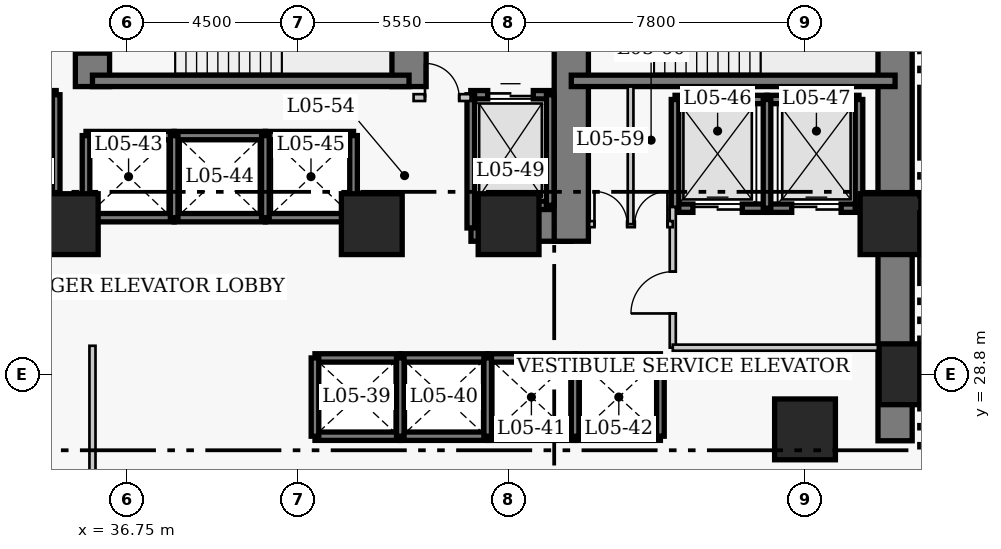
"""IFC4 building model, lengths in metres.
Left out: names, types, materials, properties, quantities, classifications, styles, units other than length and angle.
Written with IfcOpenShell. Run it as: python <this file> out.ifc"""

import sys

from ifc_helpers import new_model, si_unit, direction, frame, frame_2d, origin, origin_2d, place, context, subcontext, project, spatial, rectangle, extrude, element, fill, save


model = new_model("IFC4")
c1 = context("Model", 3, precision=1e-05, world=origin(), true_north=direction((0.0, 1.0)))
c2 = subcontext(c1, "Body", "Model", "MODEL_VIEW")
j1 = project(units=[si_unit("LENGTHUNIT", "METRE"), si_unit("PLANEANGLEUNIT", "RADIAN")], contexts=[c1])
p1 = place(None, origin())
s1 = spatial("IfcSite", under=j1, at=p1, CompositionType="ELEMENT")
p2 = place(p1, origin())
s2 = spatial("IfcBuilding", under=s1, at=p2, CompositionType="ELEMENT")
p3 = place(p2, frame((0.0, 0.0, 26.0)))
s3 = spatial("IfcBuildingStorey", under=s2, at=p3, CompositionType="ELEMENT", Elevation=26.0)
p4 = place(p3, frame((56.97, 27.05, 0.0), z_axis=(0.0, 0.0, 1.0), x_axis=(0.0, 1.0, 0.0)))
e1 = element("IfcWall", 1, at=p4, inside=s3, PredefinedType="SHEAR", context=c2, shape_type="SweptSolid", body=[
    extrude(rectangle(XDim=13.72, YDim=0.9, at=frame_2d((6.86, 0.0))), origin(), (0.0, 0.0, 1.0), 3.8),
])
p5 = place(p3, frame((45.81, 32.75, 0.0), z_axis=(0.0, 0.0, 1.0), x_axis=(1.0, 0.0, 0.0)))
e2 = element("IfcWall", 2, at=p5, inside=s3, PredefinedType="SHEAR", context=c2, shape_type="SweptSolid", body=[
    extrude(rectangle(XDim=2.64, YDim=0.9, at=frame_2d((1.32, 0.0))), origin(), (0.0, 0.0, 1.0), 3.8),
])
p6 = place(p3, frame((35.85, 36.37, 0.0), z_axis=(0.0, 0.0, 1.0), x_axis=(0.0, 1.0, 0.0)))
e3 = element("IfcWall", 3, at=p6, inside=s3, PredefinedType="SHEAR", context=c2, shape_type="SweptSolid", body=[
    extrude(rectangle(XDim=3.95, YDim=0.9, at=frame_2d((1.975, 0.0))), origin(), (0.0, 0.0, 1.0), 3.8),
])
p7 = place(p6, frame((0.88, 0.0, 0.0)))
e4 = element("IfcOpeningElement", 4, at=p7, cuts=e3, PredefinedType="OPENING", context=c2, shape_type="SweptSolid", body=[
    extrude(rectangle(XDim=1.1, YDim=2.15, at=frame_2d((0.55, 1.075))), frame((0.0, 0.46, 0.0), z_axis=(0.0, -1.0, 0.0), x_axis=(1.0, 0.0, 0.0)), (0.0, 0.0, 1.0), 0.92),
])
p8 = place(p3, frame((44.18, 36.37, 0.0), z_axis=(0.0, 0.0, 1.0), x_axis=(0.0, 1.0, 0.0)))
e5 = element("IfcWall", 5, at=p8, inside=s3, PredefinedType="SHEAR", context=c2, shape_type="SweptSolid", body=[
    extrude(rectangle(XDim=3.95, YDim=0.9, at=frame_2d((1.975, 0.0))), origin(), (0.0, 0.0, 1.0), 3.8),
])
p9 = place(p3, frame((48.45, 32.3, 0.0), z_axis=(0.0, 0.0, 1.0), x_axis=(0.0, 1.0, 0.0)))
e6 = element("IfcWall", 6, at=p9, inside=s3, PredefinedType="SHEAR", context=c2, shape_type="SweptSolid", body=[
    extrude(rectangle(XDim=8.02, YDim=0.9, at=frame_2d((4.01, 0.0))), origin(), (0.0, 0.0, 1.0), 3.8),
])
p10 = place(p9, frame((5.9, 0.0, 0.0)))
e7 = element("IfcOpeningElement", 7, at=p10, cuts=e6, PredefinedType="OPENING", context=c2, shape_type="SweptSolid", body=[
    extrude(rectangle(XDim=1.1, YDim=2.15, at=frame_2d((0.55, 1.075))), frame((0.0, 0.46, 0.0), z_axis=(0.0, -1.0, 0.0), x_axis=(1.0, 0.0, 0.0)), (0.0, 0.0, 1.0), 0.92),
])
p11 = place(p3, frame((35.85, 36.52, 0.0), z_axis=(0.0, 0.0, 1.0), x_axis=(1.0, 0.0, 0.0)))
e8 = element("IfcWall", 8, at=p11, inside=s3, PredefinedType="SHEAR", context=c2, shape_type="SweptSolid", body=[
    extrude(rectangle(XDim=8.33, YDim=0.3, at=frame_2d((4.165, 0.0))), origin(), (0.0, 0.0, 1.0), 3.8),
])
p12 = place(p3, frame((48.45, 36.52, 0.0), z_axis=(0.0, 0.0, 1.0), x_axis=(1.0, 0.0, 0.0)))
e9 = element("IfcWall", 9, at=p12, inside=s3, PredefinedType="SHEAR", context=c2, shape_type="SweptSolid", body=[
    extrude(rectangle(XDim=8.52, YDim=0.3, at=frame_2d((4.26, 0.0))), origin(), (0.0, 0.0, 1.0), 3.8),
])
for number, where, z_axis, x_axis in (
    (10, (57.35, 28.8, 0.0), (0.0, 0.0, 1.0), (1.0, 0.0, 0.0)),
    (11, (35.2, 32.75, 0.0), (0.0, 0.0, 1.0), (1.0, 0.0, 0.0)),
    (12, (43.2, 32.75, 0.0), (0.0, 0.0, 1.0), (1.0, 0.0, 0.0)),
    (13, (46.8, 32.75, 0.0), (0.0, 0.0, 1.0), (1.0, 0.0, 0.0)),
    (14, (54.6, 27.35, 0.0), (0.0, 0.0, 1.0), (1.0, 0.0, 0.0)),
    (15, (56.85, 32.75, 0.0), (0.0, 0.0, 1.0), (1.0, 0.0, 0.0)),
):
    element("IfcColumn", number, at=place(p3, frame(where, z_axis=z_axis, x_axis=x_axis)), inside=s3, PredefinedType="COLUMN", context=c2, shape_type="SweptSolid", body=[
        extrude(rectangle(XDim=1.6, YDim=1.6, at=origin_2d()), origin(), (0.0, 0.0, 1.0), 3.8),
    ])
for number, where, z_axis, x_axis in (
    (16, (41.705, 29.23, 0.0), (0.0, 0.0, 1.0), (1.0, 0.0, 0.0)),
    (17, (41.705, 27.17, 0.0), (0.0, 0.0, 1.0), (1.0, 0.0, 0.0)),
):
    element("IfcWall", number, at=place(p3, frame(where, z_axis=z_axis, x_axis=x_axis)), inside=s3, PredefinedType="SHEAR", context=c2, shape_type="SweptSolid", body=[
        extrude(rectangle(XDim=2.245, YDim=0.22, at=frame_2d((1.123, 0.0))), origin(), (0.0, 0.0, 1.0), 3.8),
    ])
p13 = place(p3, frame((41.705, 27.17, 0.0), z_axis=(0.0, 0.0, 1.0), x_axis=(0.0, 1.0, 0.0)))
e18 = element("IfcWall", 18, at=p13, inside=s3, PredefinedType="SHEAR", context=c2, shape_type="SweptSolid", body=[
    extrude(rectangle(XDim=2.06, YDim=0.2, at=frame_2d((1.03, 0.0))), origin(), (0.0, 0.0, 1.0), 3.8),
])
for number, where, z_axis, x_axis in (
    (19, (43.95, 29.23, 0.0), (0.0, 0.0, 1.0), (1.0, 0.0, 0.0)),
    (20, (43.95, 27.17, 0.0), (0.0, 0.0, 1.0), (1.0, 0.0, 0.0)),
):
    element("IfcWall", number, at=place(p3, frame(where, z_axis=z_axis, x_axis=x_axis)), inside=s3, PredefinedType="SHEAR", context=c2, shape_type="SweptSolid", body=[
        extrude(rectangle(XDim=2.3, YDim=0.22, at=frame_2d((1.15, 0.0))), origin(), (0.0, 0.0, 1.0), 3.8),
    ])
p14 = place(p3, frame((43.95, 27.17, 0.0), z_axis=(0.0, 0.0, 1.0), x_axis=(0.0, 1.0, 0.0)))
e21 = element("IfcWall", 21, at=p14, inside=s3, PredefinedType="SHEAR", context=c2, shape_type="SweptSolid", body=[
    extrude(rectangle(XDim=2.06, YDim=0.2, at=frame_2d((1.03, 0.0))), origin(), (0.0, 0.0, 1.0), 3.8),
])
for number, where, z_axis, x_axis in (
    (22, (46.25, 29.23, 0.0), (0.0, 0.0, 1.0), (1.0, 0.0, 0.0)),
    (23, (46.25, 27.17, 0.0), (0.0, 0.0, 1.0), (1.0, 0.0, 0.0)),
):
    element("IfcWall", number, at=place(p3, frame(where, z_axis=z_axis, x_axis=x_axis)), inside=s3, PredefinedType="SHEAR", context=c2, shape_type="SweptSolid", body=[
        extrude(rectangle(XDim=2.3, YDim=0.22, at=frame_2d((1.15, 0.0))), origin(), (0.0, 0.0, 1.0), 3.8),
    ])
p15 = place(p3, frame((46.25, 27.17, 0.0), z_axis=(0.0, 0.0, 1.0), x_axis=(0.0, 1.0, 0.0)))
e24 = element("IfcWall", 24, at=p15, inside=s3, PredefinedType="SHEAR", context=c2, shape_type="SweptSolid", body=[
    extrude(rectangle(XDim=2.06, YDim=0.2, at=frame_2d((1.03, 0.0))), origin(), (0.0, 0.0, 1.0), 3.8),
])
for number, where, z_axis, x_axis in (
    (25, (48.55, 29.23, 0.0), (0.0, 0.0, 1.0), (1.0, 0.0, 0.0)),
    (26, (48.55, 27.17, 0.0), (0.0, 0.0, 1.0), (1.0, 0.0, 0.0)),
):
    element("IfcWall", number, at=place(p3, frame(where, z_axis=z_axis, x_axis=x_axis)), inside=s3, PredefinedType="SHEAR", context=c2, shape_type="SweptSolid", body=[
        extrude(rectangle(XDim=2.245, YDim=0.22, at=frame_2d((1.123, 0.0))), origin(), (0.0, 0.0, 1.0), 3.8),
    ])
for number, where, z_axis, x_axis in (
    (27, (48.55, 27.17, 0.0), (0.0, 0.0, 1.0), (0.0, 1.0, 0.0)),
    (28, (50.795, 27.17, 0.0), (0.0, 0.0, 1.0), (0.0, 1.0, 0.0)),
):
    element("IfcWall", number, at=place(p3, frame(where, z_axis=z_axis, x_axis=x_axis)), inside=s3, PredefinedType="SHEAR", context=c2, shape_type="SweptSolid", body=[
        extrude(rectangle(XDim=2.06, YDim=0.2, at=frame_2d((1.03, 0.0))), origin(), (0.0, 0.0, 1.0), 3.8),
    ])
for number, where, z_axis, x_axis in (
    (29, (35.68, 35.08, 0.0), (0.0, 0.0, 1.0), (1.0, 0.0, 0.0)),
    (30, (35.68, 32.92, 0.0), (0.0, 0.0, 1.0), (1.0, 0.0, 0.0)),
):
    element("IfcWall", number, at=place(p3, frame(where, z_axis=z_axis, x_axis=x_axis)), inside=s3, PredefinedType="SHEAR", context=c2, shape_type="SweptSolid", body=[
        extrude(rectangle(XDim=2.32, YDim=0.22, at=frame_2d((1.16, 0.0))), origin(), (0.0, 0.0, 1.0), 3.8),
    ])
p16 = place(p3, frame((35.68, 32.92, 0.0), z_axis=(0.0, 0.0, 1.0), x_axis=(0.0, 1.0, 0.0)))
e31 = element("IfcWall", 31, at=p16, inside=s3, PredefinedType="SHEAR", context=c2, shape_type="SweptSolid", body=[
    extrude(rectangle(XDim=2.16, YDim=0.2, at=frame_2d((1.08, 0.0))), origin(), (0.0, 0.0, 1.0), 3.8),
])
for number, where, z_axis, x_axis in (
    (32, (38.0, 35.08, 0.0), (0.0, 0.0, 1.0), (1.0, 0.0, 0.0)),
    (33, (38.0, 32.92, 0.0), (0.0, 0.0, 1.0), (1.0, 0.0, 0.0)),
):
    element("IfcWall", number, at=place(p3, frame(where, z_axis=z_axis, x_axis=x_axis)), inside=s3, PredefinedType="SHEAR", context=c2, shape_type="SweptSolid", body=[
        extrude(rectangle(XDim=2.4, YDim=0.22, at=frame_2d((1.2, 0.0))), origin(), (0.0, 0.0, 1.0), 3.8),
    ])
p17 = place(p3, frame((38.0, 32.92, 0.0), z_axis=(0.0, 0.0, 1.0), x_axis=(0.0, 1.0, 0.0)))
e34 = element("IfcWall", 34, at=p17, inside=s3, PredefinedType="SHEAR", context=c2, shape_type="SweptSolid", body=[
    extrude(rectangle(XDim=2.16, YDim=0.2, at=frame_2d((1.08, 0.0))), origin(), (0.0, 0.0, 1.0), 3.8),
])
for number, where, z_axis, x_axis in (
    (35, (40.4, 35.08, 0.0), (0.0, 0.0, 1.0), (1.0, 0.0, 0.0)),
    (36, (40.4, 32.92, 0.0), (0.0, 0.0, 1.0), (1.0, 0.0, 0.0)),
):
    element("IfcWall", number, at=place(p3, frame(where, z_axis=z_axis, x_axis=x_axis)), inside=s3, PredefinedType="SHEAR", context=c2, shape_type="SweptSolid", body=[
        extrude(rectangle(XDim=2.32, YDim=0.22, at=frame_2d((1.16, 0.0))), origin(), (0.0, 0.0, 1.0), 3.8),
    ])
for number, where, z_axis, x_axis in (
    (37, (40.4, 32.92, 0.0), (0.0, 0.0, 1.0), (0.0, 1.0, 0.0)),
    (38, (42.72, 32.92, 0.0), (0.0, 0.0, 1.0), (0.0, 1.0, 0.0)),
):
    element("IfcWall", number, at=place(p3, frame(where, z_axis=z_axis, x_axis=x_axis)), inside=s3, PredefinedType="SHEAR", context=c2, shape_type="SweptSolid", body=[
        extrude(rectangle(XDim=2.16, YDim=0.2, at=frame_2d((1.08, 0.0))), origin(), (0.0, 0.0, 1.0), 3.8),
    ])
p18 = place(p3, frame((51.18, 36.03, 0.0), z_axis=(0.0, 0.0, 1.0), x_axis=(1.0, 0.0, 0.0)))
e39 = element("IfcWall", 39, at=p18, inside=s3, PredefinedType="SHEAR", context=c2, shape_type="SweptSolid", body=[
    extrude(rectangle(XDim=2.42, YDim=0.22, at=frame_2d((1.21, 0.0))), origin(), (0.0, 0.0, 1.0), 3.8),
])
p19 = place(p3, frame((51.18, 33.17, 0.0), z_axis=(0.0, 0.0, 1.0), x_axis=(1.0, 0.0, 0.0)))
e40 = element("IfcWall", 40, at=p19, inside=s3, PredefinedType="SHEAR", context=c2, shape_type="SweptSolid", body=[
    extrude(rectangle(XDim=2.42, YDim=0.22, at=frame_2d((1.21, 0.0))), origin(), (0.0, 0.0, 1.0), 3.8),
])
p20 = place(p19, frame((0.47, 0.0, 0.0)))
e41 = element("IfcOpeningElement", 41, at=p20, cuts=e40, PredefinedType="OPENING", context=c2, shape_type="SweptSolid", body=[
    extrude(rectangle(XDim=1.3, YDim=2.15, at=frame_2d((0.65, 1.075))), frame((0.0, 0.12, 0.0), z_axis=(0.0, -1.0, 0.0), x_axis=(1.0, 0.0, 0.0)), (0.0, 0.0, 1.0), 0.24),
])
p21 = place(p3, frame((51.18, 33.17, 0.0), z_axis=(0.0, 0.0, 1.0), x_axis=(0.0, 1.0, 0.0)))
e42 = element("IfcWall", 42, at=p21, inside=s3, PredefinedType="SHEAR", context=c2, shape_type="SweptSolid", body=[
    extrude(rectangle(XDim=2.86, YDim=0.2, at=frame_2d((1.43, 0.0))), origin(), (0.0, 0.0, 1.0), 3.8),
])
p22 = place(p3, frame((53.6, 36.03, 0.0), z_axis=(0.0, 0.0, 1.0), x_axis=(1.0, 0.0, 0.0)))
e43 = element("IfcWall", 43, at=p22, inside=s3, PredefinedType="SHEAR", context=c2, shape_type="SweptSolid", body=[
    extrude(rectangle(XDim=2.42, YDim=0.22, at=frame_2d((1.21, 0.0))), origin(), (0.0, 0.0, 1.0), 3.8),
])
p23 = place(p3, frame((53.6, 33.17, 0.0), z_axis=(0.0, 0.0, 1.0), x_axis=(1.0, 0.0, 0.0)))
e44 = element("IfcWall", 44, at=p23, inside=s3, PredefinedType="SHEAR", context=c2, shape_type="SweptSolid", body=[
    extrude(rectangle(XDim=2.42, YDim=0.22, at=frame_2d((1.21, 0.0))), origin(), (0.0, 0.0, 1.0), 3.8),
])
p24 = place(p23, frame((0.65, 0.0, 0.0)))
e45 = element("IfcOpeningElement", 45, at=p24, cuts=e44, PredefinedType="OPENING", context=c2, shape_type="SweptSolid", body=[
    extrude(rectangle(XDim=1.3, YDim=2.15, at=frame_2d((0.65, 1.075))), frame((0.0, 0.12, 0.0), z_axis=(0.0, -1.0, 0.0), x_axis=(1.0, 0.0, 0.0)), (0.0, 0.0, 1.0), 0.24),
])
for number, where, z_axis, x_axis in (
    (46, (53.6, 33.17, 0.0), (0.0, 0.0, 1.0), (0.0, 1.0, 0.0)),
    (47, (56.02, 33.17, 0.0), (0.0, 0.0, 1.0), (0.0, 1.0, 0.0)),
):
    element("IfcWall", number, at=place(p3, frame(where, z_axis=z_axis, x_axis=x_axis)), inside=s3, PredefinedType="SHEAR", context=c2, shape_type="SweptSolid", body=[
        extrude(rectangle(XDim=2.86, YDim=0.2, at=frame_2d((1.43, 0.0))), origin(), (0.0, 0.0, 1.0), 3.8),
    ])
p25 = place(p3, frame((32.805, 36.155, 0.0), z_axis=(0.0, 0.0, 1.0), x_axis=(1.0, 0.0, 0.0)))
e48 = element("IfcWall", 48, at=p25, inside=s3, PredefinedType="SHEAR", context=c2, shape_type="SweptSolid", body=[
    extrude(rectangle(XDim=2.09, YDim=0.22, at=frame_2d((1.045, 0.0))), origin(), (0.0, 0.0, 1.0), 3.8),
])
p26 = place(p25, frame((0.445, 0.0, 0.0)))
e49 = element("IfcOpeningElement", 49, at=p26, cuts=e48, PredefinedType="OPENING", context=c2, shape_type="SweptSolid", body=[
    extrude(rectangle(XDim=1.2, YDim=2.15, at=frame_2d((0.6, 1.075))), frame((0.0, 0.12, 0.0), z_axis=(0.0, -1.0, 0.0), x_axis=(1.0, 0.0, 0.0)), (0.0, 0.0, 1.0), 0.24),
])
p27 = place(p3, frame((32.805, 33.245, 0.0), z_axis=(0.0, 0.0, 1.0), x_axis=(1.0, 0.0, 0.0)))
e50 = element("IfcWall", 50, at=p27, inside=s3, PredefinedType="SHEAR", context=c2, shape_type="SweptSolid", body=[
    extrude(rectangle(XDim=2.09, YDim=0.22, at=frame_2d((1.045, 0.0))), origin(), (0.0, 0.0, 1.0), 3.8),
])
p28 = place(p3, frame((34.895, 33.245, 0.0), z_axis=(0.0, 0.0, 1.0), x_axis=(0.0, 1.0, 0.0)))
e51 = element("IfcWall", 51, at=p28, inside=s3, PredefinedType="SHEAR", context=c2, shape_type="SweptSolid", body=[
    extrude(rectangle(XDim=2.91, YDim=0.2, at=frame_2d((1.455, 0.0))), origin(), (0.0, 0.0, 1.0), 3.8),
])
p29 = place(p3, frame((45.805, 36.155, 0.0), z_axis=(0.0, 0.0, 1.0), x_axis=(1.0, 0.0, 0.0)))
e52 = element("IfcWall", 52, at=p29, inside=s3, PredefinedType="SHEAR", context=c2, shape_type="SweptSolid", body=[
    extrude(rectangle(XDim=2.09, YDim=0.22, at=frame_2d((1.045, 0.0))), origin(), (0.0, 0.0, 1.0), 3.8),
])
p30 = place(p29, frame((0.445, 0.0, 0.0)))
e53 = element("IfcOpeningElement", 53, at=p30, cuts=e52, PredefinedType="OPENING", context=c2, shape_type="SweptSolid", body=[
    extrude(rectangle(XDim=1.2, YDim=2.15, at=frame_2d((0.6, 1.075))), frame((0.0, 0.12, 0.0), z_axis=(0.0, -1.0, 0.0), x_axis=(1.0, 0.0, 0.0)), (0.0, 0.0, 1.0), 0.24),
])
p31 = place(p3, frame((45.805, 33.245, 0.0), z_axis=(0.0, 0.0, 1.0), x_axis=(1.0, 0.0, 0.0)))
e54 = element("IfcWall", 54, at=p31, inside=s3, PredefinedType="SHEAR", context=c2, shape_type="SweptSolid", body=[
    extrude(rectangle(XDim=2.09, YDim=0.22, at=frame_2d((1.045, 0.0))), origin(), (0.0, 0.0, 1.0), 3.8),
])
p32 = place(p3, frame((45.805, 32.65, 0.0), z_axis=(0.0, 0.0, 1.0), x_axis=(0.0, 1.0, 0.0)))
e55 = element("IfcWall", 55, at=p32, inside=s3, PredefinedType="SHEAR", context=c2, shape_type="SweptSolid", body=[
    extrude(rectangle(XDim=3.505, YDim=0.2, at=frame_2d((1.752, 0.0))), origin(), (0.0, 0.0, 1.0), 3.8),
])
p33 = place(p3, frame((47.895, 33.245, 0.0), z_axis=(0.0, 0.0, 1.0), x_axis=(0.0, 1.0, 0.0)))
e56 = element("IfcWall", 56, at=p33, inside=s3, PredefinedType="SHEAR", context=c2, shape_type="SweptSolid", body=[
    extrude(rectangle(XDim=2.91, YDim=0.2, at=frame_2d((1.455, 0.0))), origin(), (0.0, 0.0, 1.0), 3.8),
])
p34 = place(p3, frame((44.3, 36.08, 0.0), z_axis=(0.0, 0.0, 1.0), x_axis=(1.0, 0.0, 0.0)))
e57 = element("IfcWall", 57, at=p34, inside=s3, PredefinedType="PARTITIONING", context=c2, shape_type="SweptSolid", body=[
    extrude(rectangle(XDim=1.5, YDim=0.18, at=frame_2d((0.75, 0.0))), origin(), (0.0, 0.0, 1.0), 3.54),
])
p35 = place(p34, frame((0.3, 0.0, 0.0)))
e58 = element("IfcOpeningElement", 58, at=p35, cuts=e57, PredefinedType="OPENING", context=c2, shape_type="SweptSolid", body=[
    extrude(rectangle(XDim=0.9, YDim=2.15, at=frame_2d((0.45, 1.075))), frame((0.0, 0.1, 0.0), z_axis=(0.0, -1.0, 0.0), x_axis=(1.0, 0.0, 0.0)), (0.0, 0.0, 1.0), 0.2),
])
p36 = place(p3, frame((51.12, 29.5, 0.0), z_axis=(0.0, 0.0, 1.0), x_axis=(0.0, 1.0, 0.0)))
e59 = element("IfcWall", 59, at=p36, inside=s3, PredefinedType="PARTITIONING", context=c2, shape_type="SweptSolid", body=[
    extrude(rectangle(XDim=3.7, YDim=0.16, at=frame_2d((1.85, 0.0))), origin(), (0.0, 0.0, 1.0), 3.54),
])
p37 = place(p36, frame((0.9, 0.0, 0.0)))
e60 = element("IfcOpeningElement", 60, at=p37, cuts=e59, PredefinedType="OPENING", context=c2, shape_type="SweptSolid", body=[
    extrude(rectangle(XDim=1.1, YDim=2.15, at=frame_2d((0.55, 1.075))), frame((0.0, 0.09, 0.0), z_axis=(0.0, -1.0, 0.0), x_axis=(1.0, 0.0, 0.0)), (0.0, 0.0, 1.0), 0.18),
])
p38 = place(p3, frame((51.12, 29.5, 0.0), z_axis=(0.0, 0.0, 1.0), x_axis=(1.0, 0.0, 0.0)))
e61 = element("IfcWall", 61, at=p38, inside=s3, PredefinedType="PARTITIONING", context=c2, shape_type="SweptSolid", body=[
    extrude(rectangle(XDim=5.63, YDim=0.16, at=frame_2d((2.815, 0.0))), origin(), (0.0, 0.0, 1.0), 3.54),
])
p39 = place(p3, frame((48.92, 32.75, 0.0), z_axis=(0.0, 0.0, 1.0), x_axis=(1.0, 0.0, 0.0)))
e62 = element("IfcWall", 62, at=p39, inside=s3, PredefinedType="PARTITIONING", context=c2, shape_type="SweptSolid", body=[
    extrude(rectangle(XDim=2.2, YDim=0.16, at=frame_2d((1.1, 0.0))), origin(), (0.0, 0.0, 1.0), 3.54),
])
p40 = place(p39, frame((0.14, 0.0, 0.0)))
e63 = element("IfcOpeningElement", 63, at=p40, cuts=e62, PredefinedType="OPENING", context=c2, shape_type="SweptSolid", body=[
    extrude(rectangle(XDim=0.86, YDim=2.05, at=frame_2d((0.43, 1.025))), frame((0.0, 0.09, 0.0), z_axis=(0.0, -1.0, 0.0), x_axis=(1.0, 0.0, 0.0)), (0.0, 0.0, 1.0), 0.18),
])
p41 = place(p39, frame((1.2, 0.0, 0.0)))
e64 = element("IfcOpeningElement", 64, at=p41, cuts=e62, PredefinedType="OPENING", context=c2, shape_type="SweptSolid", body=[
    extrude(rectangle(XDim=0.86, YDim=2.05, at=frame_2d((0.43, 1.025))), frame((0.0, 0.09, 0.0), z_axis=(0.0, -1.0, 0.0), x_axis=(1.0, 0.0, 0.0)), (0.0, 0.0, 1.0), 0.18),
])
p42 = place(p3, frame((50.01, 32.75, 0.0), z_axis=(0.0, 0.0, 1.0), x_axis=(0.0, 1.0, 0.0)))
e65 = element("IfcWall", 65, at=p42, inside=s3, PredefinedType="PARTITIONING", context=c2, shape_type="SweptSolid", body=[
    extrude(rectangle(XDim=3.62, YDim=0.15, at=frame_2d((1.81, 0.0))), origin(), (0.0, 0.0, 1.0), 3.54),
])
p43 = place(p3, frame((35.85, 24.71, 0.0), z_axis=(0.0, 0.0, 1.0), x_axis=(0.0, 1.0, 0.0)))
e66 = element("IfcWall", 66, at=p43, inside=s3, PredefinedType="PARTITIONING", context=c2, shape_type="SweptSolid", body=[
    extrude(rectangle(XDim=4.84, YDim=0.16, at=frame_2d((2.42, 0.0))), origin(), (0.0, 0.0, 1.0), 3.54),
])
p44 = place(p20, origin())
e67 = element("IfcDoor", 67, at=p44, inside=s3, OperationType="DOUBLE_DOOR_SLIDING", PredefinedType="DOOR", context=c2, shape_type="SweptSolid", body=[
    extrude(rectangle(XDim=1.3, YDim=2.15, at=frame_2d((0.65, 1.075))), frame((0.0, 0.025, 0.0), z_axis=(0.0, -1.0, 0.0), x_axis=(1.0, 0.0, 0.0)), (0.0, 0.0, 1.0), 0.05),
])
fill(e41, e67)
p45 = place(p24, origin())
e68 = element("IfcDoor", 68, at=p45, inside=s3, OperationType="DOUBLE_DOOR_SLIDING", PredefinedType="DOOR", context=c2, shape_type="SweptSolid", body=[
    extrude(rectangle(XDim=1.3, YDim=2.15, at=frame_2d((0.65, 1.075))), frame((0.0, 0.025, 0.0), z_axis=(0.0, -1.0, 0.0), x_axis=(1.0, 0.0, 0.0)), (0.0, 0.0, 1.0), 0.05),
])
fill(e45, e68)
p46 = place(p30, origin())
e69 = element("IfcDoor", 69, at=p46, inside=s3, OperationType="DOUBLE_DOOR_SLIDING", PredefinedType="DOOR", context=c2, shape_type="SweptSolid", body=[
    extrude(rectangle(XDim=1.2, YDim=2.15, at=frame_2d((0.6, 1.075))), frame((0.0, 0.025, 0.0), z_axis=(0.0, -1.0, 0.0), x_axis=(1.0, 0.0, 0.0)), (0.0, 0.0, 1.0), 0.05),
])
fill(e53, e69)
p47 = place(p35, origin())
e70 = element("IfcDoor", 70, at=p47, inside=s3, OperationType="SINGLE_SWING_LEFT", PredefinedType="DOOR", context=c2, shape_type="SweptSolid", body=[
    extrude(rectangle(XDim=0.9, YDim=2.15, at=frame_2d((0.45, 1.075))), frame((0.0, 0.025, 0.0), z_axis=(0.0, -1.0, 0.0), x_axis=(1.0, 0.0, 0.0)), (0.0, 0.0, 1.0), 0.05),
])
fill(e58, e70)
p48 = place(p37, origin())
e71 = element("IfcDoor", 71, at=p48, inside=s3, OperationType="SINGLE_SWING_LEFT", PredefinedType="DOOR", context=c2, shape_type="SweptSolid", body=[
    extrude(rectangle(XDim=1.1, YDim=2.15, at=frame_2d((0.55, 1.075))), frame((0.0, 0.025, 0.0), z_axis=(0.0, -1.0, 0.0), x_axis=(1.0, 0.0, 0.0)), (0.0, 0.0, 1.0), 0.05),
])
fill(e60, e71)
p49 = place(p40, origin())
e72 = element("IfcDoor", 72, at=p49, inside=s3, OperationType="SINGLE_SWING_LEFT", PredefinedType="DOOR", context=c2, shape_type="SweptSolid", body=[
    extrude(rectangle(XDim=0.86, YDim=2.05, at=frame_2d((0.43, 1.025))), frame((0.0, 0.025, 0.0), z_axis=(0.0, -1.0, 0.0), x_axis=(1.0, 0.0, 0.0)), (0.0, 0.0, 1.0), 0.05),
])
fill(e63, e72)
p50 = place(p41, origin())
e73 = element("IfcDoor", 73, at=p50, inside=s3, OperationType="SINGLE_SWING_RIGHT", PredefinedType="DOOR", context=c2, shape_type="SweptSolid", body=[
    extrude(rectangle(XDim=0.86, YDim=2.05, at=frame_2d((0.43, 1.025))), frame((0.0, 0.025, 0.0), z_axis=(0.0, -1.0, 0.0), x_axis=(1.0, 0.0, 0.0)), (0.0, 0.0, 1.0), 0.05),
])
fill(e64, e73)
p51 = place(p7, origin())
e74 = element("IfcDoor", 74, at=p51, inside=s3, OperationType="SINGLE_SWING_RIGHT", PredefinedType="DOOR", context=c2, shape_type="SweptSolid", body=[
    extrude(rectangle(XDim=1.1, YDim=2.15, at=frame_2d((0.55, 1.075))), frame((0.0, 0.025, 0.0), z_axis=(0.0, -1.0, 0.0), x_axis=(1.0, 0.0, 0.0)), (0.0, 0.0, 1.0), 0.05),
])
fill(e4, e74)
save(model, sys.argv[1])
